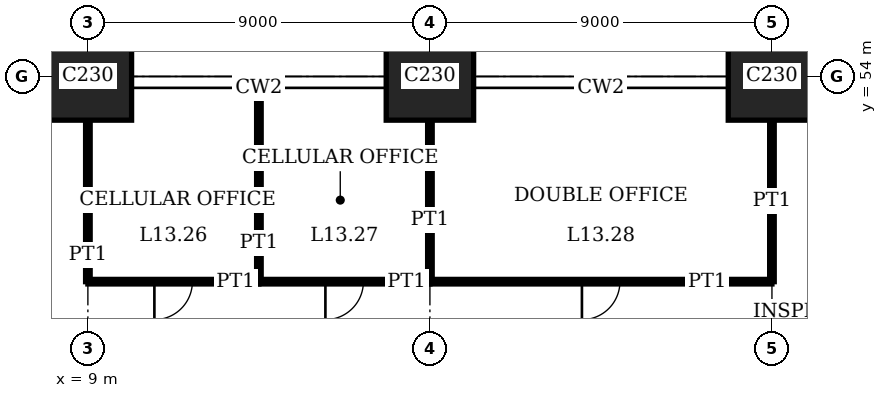
"""IFC4 building model, lengths in metres.
Left out: names, types, materials, properties, quantities, classifications, styles, units other than length and angle.
Written with IfcOpenShell. Run it as: python <this file> out.ifc"""

import sys

from ifc_helpers import new_model, si_unit, direction, frame, frame_2d, origin, origin_2d, place, context, subcontext, project, spatial, rectangle, extrude, element, fill, save


model = new_model("IFC4")
c1 = context("Model", 3, precision=1e-05, world=origin(), true_north=direction((0.0, 1.0)))
c2 = subcontext(c1, "Body", "Model", "MODEL_VIEW")
j1 = project(units=[si_unit("LENGTHUNIT", "METRE"), si_unit("PLANEANGLEUNIT", "RADIAN")], contexts=[c1])
p1 = place(None, origin())
s1 = spatial("IfcSite", under=j1, at=p1, CompositionType="ELEMENT")
p2 = place(p1, origin())
s2 = spatial("IfcBuilding", under=s1, at=p2, CompositionType="ELEMENT")
p3 = place(p2, frame((0.0, 0.0, 55.8)))
s3 = spatial("IfcBuildingStorey", under=s2, at=p3, CompositionType="ELEMENT", Elevation=55.8)
for number, where, z_axis, x_axis in (
    (1, (9.0, 54.0, 0.0), (0.0, 0.0, 1.0), (1.0, 0.0, 0.0)),
    (2, (18.0, 54.0, 0.0), (0.0, 0.0, 1.0), (1.0, 0.0, 0.0)),
    (3, (27.0, 54.0, 0.0), (0.0, 0.0, 1.0), (1.0, 0.0, 0.0)),
):
    element("IfcColumn", number, at=place(p3, frame(where, z_axis=z_axis, x_axis=x_axis)), inside=s3, PredefinedType="COLUMN", context=c2, shape_type="SweptSolid", body=[
        extrude(rectangle(XDim=2.3, YDim=2.3, at=origin_2d()), origin(), (0.0, 0.0, 1.0), 4.0),
    ])
p4 = place(p3, frame((9.0, 48.6, 0.0), z_axis=(0.0, 0.0, 1.0), x_axis=(1.0, 0.0, 0.0)))
e4 = element("IfcWall", 4, at=p4, inside=s3, PredefinedType="PARTITIONING", context=c2, shape_type="SweptSolid", body=[
    extrude(rectangle(XDim=4.5, YDim=0.12, at=frame_2d((2.25, 0.0))), origin(), (0.0, 0.0, 1.0), 3.75),
])
p5 = place(p4, frame((1.75, 0.0, 0.0)))
e5 = element("IfcOpeningElement", 5, at=p5, cuts=e4, PredefinedType="OPENING", context=c2, shape_type="SweptSolid", body=[
    extrude(rectangle(XDim=1.0, YDim=2.4, at=frame_2d((0.5, 1.2))), frame((0.0, 0.07, 0.0), z_axis=(0.0, -1.0, 0.0), x_axis=(1.0, 0.0, 0.0)), (0.0, 0.0, 1.0), 0.14),
])
p6 = place(p3, frame((13.5, 48.6, 0.0), z_axis=(0.0, 0.0, 1.0), x_axis=(1.0, 0.0, 0.0)))
e6 = element("IfcWall", 6, at=p6, inside=s3, PredefinedType="PARTITIONING", context=c2, shape_type="SweptSolid", body=[
    extrude(rectangle(XDim=4.5, YDim=0.12, at=frame_2d((2.25, 0.0))), origin(), (0.0, 0.0, 1.0), 3.75),
])
p7 = place(p6, frame((1.75, 0.0, 0.0)))
e7 = element("IfcOpeningElement", 7, at=p7, cuts=e6, PredefinedType="OPENING", context=c2, shape_type="SweptSolid", body=[
    extrude(rectangle(XDim=1.0, YDim=2.4, at=frame_2d((0.5, 1.2))), frame((0.0, 0.07, 0.0), z_axis=(0.0, -1.0, 0.0), x_axis=(1.0, 0.0, 0.0)), (0.0, 0.0, 1.0), 0.14),
])
p8 = place(p3, frame((18.0, 48.6, 0.0), z_axis=(0.0, 0.0, 1.0), x_axis=(1.0, 0.0, 0.0)))
e8 = element("IfcWall", 8, at=p8, inside=s3, PredefinedType="PARTITIONING", context=c2, shape_type="SweptSolid", body=[
    extrude(rectangle(XDim=9.0, YDim=0.12, at=frame_2d((4.5, 0.0))), origin(), (0.0, 0.0, 1.0), 3.75),
])
p9 = place(p8, frame((4.0, 0.0, 0.0)))
e9 = element("IfcOpeningElement", 9, at=p9, cuts=e8, PredefinedType="OPENING", context=c2, shape_type="SweptSolid", body=[
    extrude(rectangle(XDim=1.0, YDim=2.4, at=frame_2d((0.5, 1.2))), frame((0.0, 0.07, 0.0), z_axis=(0.0, -1.0, 0.0), x_axis=(1.0, 0.0, 0.0)), (0.0, 0.0, 1.0), 0.14),
])
p10 = place(p3, frame((9.0, 48.6, 0.0), z_axis=(0.0, 0.0, 1.0), x_axis=(0.0, 1.0, 0.0)))
e10 = element("IfcWall", 10, at=p10, inside=s3, PredefinedType="PARTITIONING", context=c2, shape_type="SweptSolid", body=[
    extrude(rectangle(XDim=4.25, YDim=0.12, at=frame_2d((2.125, 0.0))), origin(), (0.0, 0.0, 1.0), 3.05),
])
p11 = place(p3, frame((13.5, 48.6, 0.0), z_axis=(0.0, 0.0, 1.0), x_axis=(0.0, 1.0, 0.0)))
e11 = element("IfcWall", 11, at=p11, inside=s3, PredefinedType="PARTITIONING", context=c2, shape_type="SweptSolid", body=[
    extrude(rectangle(XDim=5.09, YDim=0.12, at=frame_2d((2.545, 0.0))), origin(), (0.0, 0.0, 1.0), 3.75),
])
for number, where, z_axis, x_axis in (
    (12, (18.0, 48.6, 0.0), (0.0, 0.0, 1.0), (0.0, 1.0, 0.0)),
    (13, (27.0, 48.6, 0.0), (0.0, 0.0, 1.0), (0.0, 1.0, 0.0)),
):
    element("IfcWall", number, at=place(p3, frame(where, z_axis=z_axis, x_axis=x_axis)), inside=s3, PredefinedType="PARTITIONING", context=c2, shape_type="SweptSolid", body=[
        extrude(rectangle(XDim=4.25, YDim=0.12, at=frame_2d((2.125, 0.0))), origin(), (0.0, 0.0, 1.0), 3.05),
    ])
p12 = place(p5, origin())
e14 = element("IfcDoor", 14, at=p12, inside=s3, OperationType="SINGLE_SWING_LEFT", PredefinedType="DOOR", context=c2, shape_type="SweptSolid", body=[
    extrude(rectangle(XDim=1.0, YDim=2.4, at=frame_2d((0.5, 1.2))), frame((0.0, 0.025, 0.0), z_axis=(0.0, -1.0, 0.0), x_axis=(1.0, 0.0, 0.0)), (0.0, 0.0, 1.0), 0.05),
])
fill(e5, e14)
p13 = place(p7, origin())
e15 = element("IfcDoor", 15, at=p13, inside=s3, OperationType="SINGLE_SWING_LEFT", PredefinedType="DOOR", context=c2, shape_type="SweptSolid", body=[
    extrude(rectangle(XDim=1.0, YDim=2.4, at=frame_2d((0.5, 1.2))), frame((0.0, 0.025, 0.0), z_axis=(0.0, -1.0, 0.0), x_axis=(1.0, 0.0, 0.0)), (0.0, 0.0, 1.0), 0.05),
])
fill(e7, e15)
p14 = place(p9, origin())
e16 = element("IfcDoor", 16, at=p14, inside=s3, OperationType="SINGLE_SWING_LEFT", PredefinedType="DOOR", context=c2, shape_type="SweptSolid", body=[
    extrude(rectangle(XDim=1.0, YDim=2.4, at=frame_2d((0.5, 1.2))), frame((0.0, 0.025, 0.0), z_axis=(0.0, -1.0, 0.0), x_axis=(1.0, 0.0, 0.0)), (0.0, 0.0, 1.0), 0.05),
])
fill(e9, e16)
save(model, sys.argv[1])
